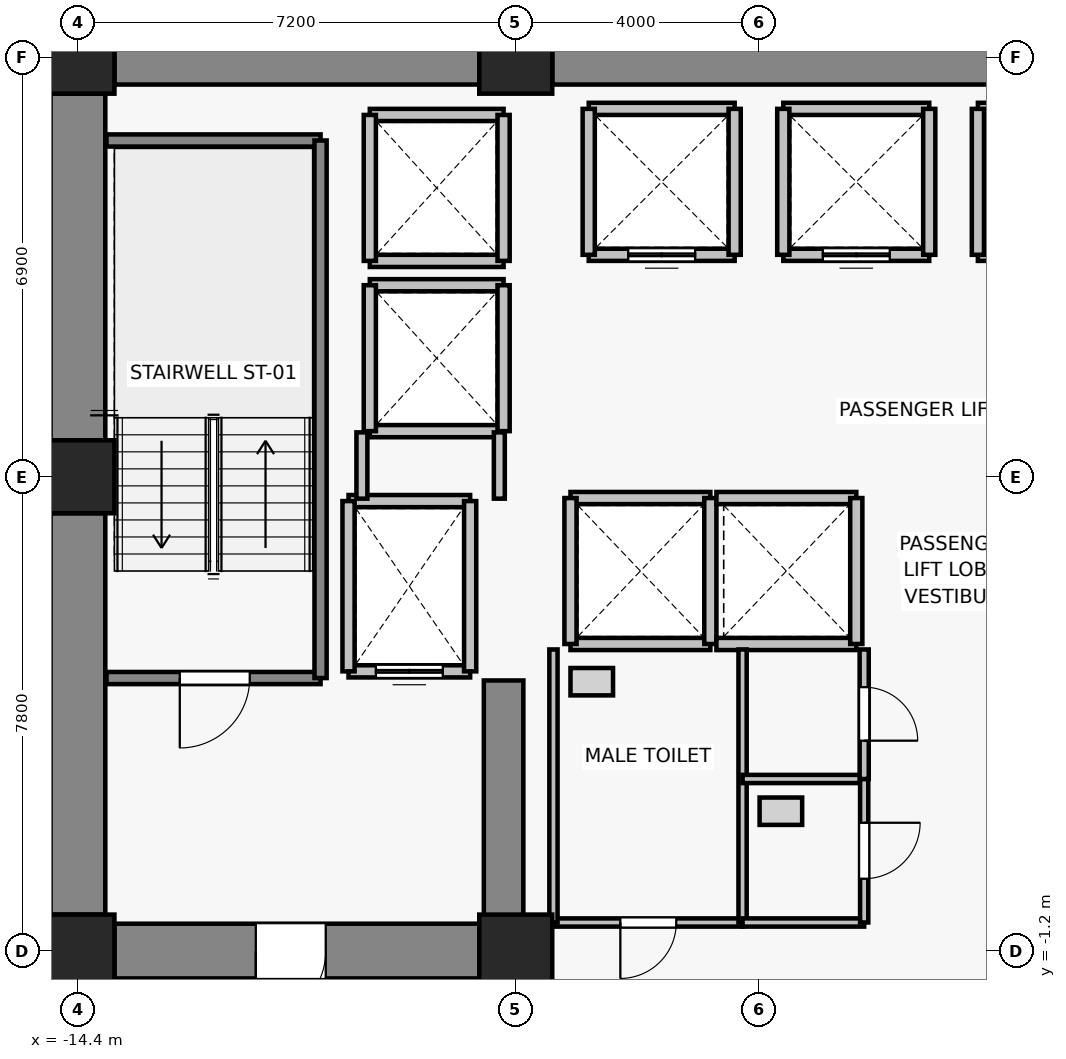
"""IFC4 building model, lengths in metres.
Left out: names, types, materials, properties, quantities, classifications, styles, units other than length and angle.
Written with IfcOpenShell. Run it as: python <this file> out.ifc"""

import sys

from ifc_helpers import new_model, si_unit, direction, frame, frame_2d, origin, origin_2d, place, context, subcontext, project, spatial, rectangle, extrude, source, transform, mapped, element, fill, save


model = new_model("IFC4")
c1 = context("Model", 3, precision=1e-05, world=origin(), true_north=direction((0.0, 1.0)))
c2 = subcontext(c1, "Body", "Model", "MODEL_VIEW")
j1 = project(units=[si_unit("LENGTHUNIT", "METRE"), si_unit("PLANEANGLEUNIT", "RADIAN")], contexts=[c1])
p1 = place(None, origin())
s1 = spatial("IfcSite", under=j1, at=p1, CompositionType="ELEMENT")
p2 = place(p1, origin())
s2 = spatial("IfcBuilding", under=s1, at=p2, CompositionType="ELEMENT")
p3 = place(p2, frame((0.0, 0.0, 27.4)))
s3 = spatial("IfcBuildingStorey", under=s2, at=p3, CompositionType="ELEMENT", Elevation=27.4)
for number, where, z_axis, x_axis in (
    (1, (-14.4, -1.2, 0.0), (0.0, 0.0, 1.0), (1.0, 0.0, 0.0)),
    (2, (-7.2, -1.2, 0.0), (0.0, 0.0, 1.0), (1.0, 0.0, 0.0)),
    (3, (-14.4, 6.6, 0.0), (0.0, 0.0, 1.0), (1.0, 0.0, 0.0)),
    (4, (-14.4, 13.5, 0.0), (0.0, 0.0, 1.0), (1.0, 0.0, 0.0)),
    (5, (-7.2, 13.5, 0.0), (0.0, 0.0, 1.0), (1.0, 0.0, 0.0)),
):
    element("IfcColumn", number, at=place(p3, frame(where, z_axis=z_axis, x_axis=x_axis)), inside=s3, PredefinedType="COLUMN", context=c2, shape_type="SweptSolid", body=[
        extrude(rectangle(XDim=1.2, YDim=1.2, at=origin_2d()), origin(), (0.0, 0.0, 1.0), 3.3),
    ])
p4 = place(p3, frame((-13.8, 13.5, 0.0), z_axis=(0.0, 0.0, 1.0), x_axis=(1.0, 0.0, 0.0)))
e6 = element("IfcWall", 6, at=p4, inside=s3, PredefinedType="SHEAR", context=c2, shape_type="SweptSolid", body=[
    extrude(rectangle(XDim=6.0, YDim=0.9, at=frame_2d((3.0, 0.0))), origin(), (0.0, 0.0, 1.0), 3.075),
])
p5 = place(p3, frame((-6.6, 13.5, 0.0), z_axis=(0.0, 0.0, 1.0), x_axis=(1.0, 0.0, 0.0)))
e7 = element("IfcWall", 7, at=p5, inside=s3, PredefinedType="SHEAR", context=c2, shape_type="SweptSolid", body=[
    extrude(rectangle(XDim=13.2, YDim=0.9, at=frame_2d((6.6, 0.0))), origin(), (0.0, 0.0, 1.0), 3.075),
])
p6 = place(p3, frame((-14.4, -0.6, 0.0), z_axis=(0.0, 0.0, 1.0), x_axis=(0.0, 1.0, 0.0)))
e8 = element("IfcWall", 8, at=p6, inside=s3, PredefinedType="SHEAR", context=c2, shape_type="SweptSolid", body=[
    extrude(rectangle(XDim=6.6, YDim=0.9, at=frame_2d((3.3, 0.0))), origin(), (0.0, 0.0, 1.0), 3.075),
])
p7 = place(p3, frame((-14.4, 7.2, 0.0), z_axis=(0.0, 0.0, 1.0), x_axis=(0.0, 1.0, 0.0)))
e9 = element("IfcWall", 9, at=p7, inside=s3, PredefinedType="SHEAR", context=c2, shape_type="SweptSolid", body=[
    extrude(rectangle(XDim=5.7, YDim=0.9, at=frame_2d((2.85, 0.0))), origin(), (0.0, 0.0, 1.0), 3.075),
])
p8 = place(p3, frame((-7.8, -1.2, 0.0), z_axis=(0.0, 0.0, 1.0), x_axis=(-1.0, 0.0, 0.0)))
e10 = element("IfcWall", 10, at=p8, inside=s3, PredefinedType="SHEAR", context=c2, shape_type="SweptSolid", body=[
    extrude(rectangle(XDim=6.0, YDim=0.9, at=frame_2d((3.0, 0.0))), origin(), (0.0, 0.0, 1.0), 3.075),
])
p9 = place(p8, frame((2.525, 0.0, 0.0)))
e11 = element("IfcOpeningElement", 11, at=p9, cuts=e10, PredefinedType="OPENING", context=c2, shape_type="SweptSolid", body=[
    extrude(rectangle(XDim=1.15, YDim=2.15, at=frame_2d((0.575, 1.075))), frame((0.0, 0.46, 0.0), z_axis=(0.0, -1.0, 0.0), x_axis=(1.0, 0.0, 0.0)), (0.0, 0.0, 1.0), 0.92),
])
p10 = place(p3, frame((-7.4, -0.75, 0.0), z_axis=(0.0, 0.0, 1.0), x_axis=(0.0, 1.0, 0.0)))
e12 = element("IfcWall", 12, at=p10, inside=s3, PredefinedType="SHEAR", context=c2, shape_type="SweptSolid", body=[
    extrude(rectangle(XDim=4.0, YDim=0.65, at=frame_2d((2.0, 0.0))), origin(), (0.0, 0.0, 1.0), 3.075),
])
p11 = place(p3, frame((-7.95, 3.4, 0.0), z_axis=(0.0, 0.0, 1.0), x_axis=(-1.0, 0.0, 0.0)))
e13 = element("IfcWall", 13, at=p11, inside=s3, PredefinedType="SOLIDWALL", context=c2, shape_type="SweptSolid", body=[
    extrude(rectangle(XDim=2.0, YDim=0.2, at=frame_2d((1.0, 0.0))), origin(), (0.0, 0.0, 1.0), 3.075),
])
p12 = place(p11, frame((0.45, 0.0, 0.0)))
e14 = element("IfcOpeningElement", 14, at=p12, cuts=e13, PredefinedType="OPENING", context=c2, shape_type="SweptSolid", body=[
    extrude(rectangle(XDim=1.1, YDim=2.2, at=frame_2d((0.55, 1.1))), frame((0.0, 0.11, 0.0), z_axis=(0.0, -1.0, 0.0), x_axis=(1.0, 0.0, 0.0)), (0.0, 0.0, 1.0), 0.22),
])
p13 = place(p3, frame((-9.95, 6.2, 0.0), z_axis=(0.0, 0.0, 1.0), x_axis=(1.0, 0.0, 0.0)))
e15 = element("IfcWall", 15, at=p13, inside=s3, PredefinedType="SOLIDWALL", context=c2, shape_type="SweptSolid", body=[
    extrude(rectangle(XDim=2.0, YDim=0.2, at=frame_2d((1.0, 0.0))), origin(), (0.0, 0.0, 1.0), 3.075),
])
for number, where, z_axis, x_axis in (
    (16, (-9.95, 3.4, 0.0), (0.0, 0.0, 1.0), (0.0, 1.0, 0.0)),
    (17, (-7.95, 6.2, 0.0), (0.0, 0.0, 1.0), (0.0, -1.0, 0.0)),
):
    element("IfcWall", number, at=place(p3, frame(where, z_axis=z_axis, x_axis=x_axis)), inside=s3, PredefinedType="SOLIDWALL", context=c2, shape_type="SweptSolid", body=[
        extrude(rectangle(XDim=2.8, YDim=0.2, at=frame_2d((1.4, 0.0))), origin(), (0.0, 0.0, 1.0), 3.075),
    ])
p14 = place(p3, frame((-3.6, 10.25, 0.0), z_axis=(0.0, 0.0, 1.0), x_axis=(-1.0, 0.0, 0.0)))
e18 = element("IfcWall", 18, at=p14, inside=s3, PredefinedType="SOLIDWALL", context=c2, shape_type="SweptSolid", body=[
    extrude(rectangle(XDim=2.4, YDim=0.2, at=frame_2d((1.2, 0.0))), origin(), (0.0, 0.0, 1.0), 3.075),
])
p15 = place(p14, frame((0.65, 0.0, 0.0)))
e19 = element("IfcOpeningElement", 19, at=p15, cuts=e18, PredefinedType="OPENING", context=c2, shape_type="SweptSolid", body=[
    extrude(rectangle(XDim=1.1, YDim=2.2, at=frame_2d((0.55, 1.1))), frame((0.0, 0.11, 0.0), z_axis=(0.0, -1.0, 0.0), x_axis=(1.0, 0.0, 0.0)), (0.0, 0.0, 1.0), 0.22),
])
for number, where, z_axis, x_axis in (
    (20, (-6.0, 12.65, 0.0), (0.0, 0.0, 1.0), (1.0, 0.0, 0.0)),
    (21, (-6.0, 10.25, 0.0), (0.0, 0.0, 1.0), (0.0, 1.0, 0.0)),
    (22, (-3.6, 12.65, 0.0), (0.0, 0.0, 1.0), (0.0, -1.0, 0.0)),
):
    element("IfcWall", number, at=place(p3, frame(where, z_axis=z_axis, x_axis=x_axis)), inside=s3, PredefinedType="SOLIDWALL", context=c2, shape_type="SweptSolid", body=[
        extrude(rectangle(XDim=2.4, YDim=0.2, at=frame_2d((1.2, 0.0))), origin(), (0.0, 0.0, 1.0), 3.075),
    ])
p16 = place(p3, frame((-0.4, 10.25, 0.0), z_axis=(0.0, 0.0, 1.0), x_axis=(-1.0, 0.0, 0.0)))
e23 = element("IfcWall", 23, at=p16, inside=s3, PredefinedType="SOLIDWALL", context=c2, shape_type="SweptSolid", body=[
    extrude(rectangle(XDim=2.4, YDim=0.2, at=frame_2d((1.2, 0.0))), origin(), (0.0, 0.0, 1.0), 3.075),
])
p17 = place(p16, frame((0.65, 0.0, 0.0)))
e24 = element("IfcOpeningElement", 24, at=p17, cuts=e23, PredefinedType="OPENING", context=c2, shape_type="SweptSolid", body=[
    extrude(rectangle(XDim=1.1, YDim=2.2, at=frame_2d((0.55, 1.1))), frame((0.0, 0.11, 0.0), z_axis=(0.0, -1.0, 0.0), x_axis=(1.0, 0.0, 0.0)), (0.0, 0.0, 1.0), 0.22),
])
p18 = place(p3, frame((-2.8, 12.65, 0.0), z_axis=(0.0, 0.0, 1.0), x_axis=(1.0, 0.0, 0.0)))
e25 = element("IfcWall", 25, at=p18, inside=s3, PredefinedType="SOLIDWALL", context=c2, shape_type="SweptSolid", body=[
    extrude(rectangle(XDim=2.4, YDim=0.2, at=frame_2d((1.2, 0.0))), origin(), (0.0, 0.0, 1.0), 3.075),
])
for number, where, z_axis, x_axis in (
    (26, (-2.8, 10.25, 0.0), (0.0, 0.0, 1.0), (0.0, 1.0, 0.0)),
    (27, (-0.4, 12.65, 0.0), (0.0, 0.0, 1.0), (0.0, -1.0, 0.0)),
):
    element("IfcWall", number, at=place(p3, frame(where, z_axis=z_axis, x_axis=x_axis)), inside=s3, PredefinedType="SOLIDWALL", context=c2, shape_type="SweptSolid", body=[
        extrude(rectangle(XDim=2.4, YDim=0.2, at=frame_2d((1.2, 0.0))), origin(), (0.0, 0.0, 1.0), 3.075),
    ])
p19 = place(p3, frame((2.8, 10.25, 0.0), z_axis=(0.0, 0.0, 1.0), x_axis=(-1.0, 0.0, 0.0)))
e28 = element("IfcWall", 28, at=p19, inside=s3, PredefinedType="SOLIDWALL", context=c2, shape_type="SweptSolid", body=[
    extrude(rectangle(XDim=2.4, YDim=0.2, at=frame_2d((1.2, 0.0))), origin(), (0.0, 0.0, 1.0), 3.075),
])
p20 = place(p19, frame((0.65, 0.0, 0.0)))
e29 = element("IfcOpeningElement", 29, at=p20, cuts=e28, PredefinedType="OPENING", context=c2, shape_type="SweptSolid", body=[
    extrude(rectangle(XDim=1.1, YDim=2.2, at=frame_2d((0.55, 1.1))), frame((0.0, 0.11, 0.0), z_axis=(0.0, -1.0, 0.0), x_axis=(1.0, 0.0, 0.0)), (0.0, 0.0, 1.0), 0.22),
])
p21 = place(p3, frame((0.4, 12.65, 0.0), z_axis=(0.0, 0.0, 1.0), x_axis=(1.0, 0.0, 0.0)))
e30 = element("IfcWall", 30, at=p21, inside=s3, PredefinedType="SOLIDWALL", context=c2, shape_type="SweptSolid", body=[
    extrude(rectangle(XDim=2.4, YDim=0.2, at=frame_2d((1.2, 0.0))), origin(), (0.0, 0.0, 1.0), 3.075),
])
p22 = place(p3, frame((0.4, 10.25, 0.0), z_axis=(0.0, 0.0, 1.0), x_axis=(0.0, 1.0, 0.0)))
e31 = element("IfcWall", 31, at=p22, inside=s3, PredefinedType="SOLIDWALL", context=c2, shape_type="SweptSolid", body=[
    extrude(rectangle(XDim=2.4, YDim=0.2, at=frame_2d((1.2, 0.0))), origin(), (0.0, 0.0, 1.0), 3.075),
])
for number, where, z_axis, x_axis in (
    (32, (-4.0, 3.85, 0.0), (0.0, 0.0, 1.0), (-1.0, 0.0, 0.0)),
    (33, (-6.3, 6.25, 0.0), (0.0, 0.0, 1.0), (1.0, 0.0, 0.0)),
):
    element("IfcWall", number, at=place(p3, frame(where, z_axis=z_axis, x_axis=x_axis)), inside=s3, PredefinedType="SOLIDWALL", context=c2, shape_type="SweptSolid", body=[
        extrude(rectangle(XDim=2.3, YDim=0.2, at=frame_2d((1.15, 0.0))), origin(), (0.0, 0.0, 1.0), 3.075),
    ])
for number, where, z_axis, x_axis in (
    (34, (-6.3, 3.85, 0.0), (0.0, 0.0, 1.0), (0.0, 1.0, 0.0)),
    (35, (-4.0, 6.25, 0.0), (0.0, 0.0, 1.0), (0.0, -1.0, 0.0)),
):
    element("IfcWall", number, at=place(p3, frame(where, z_axis=z_axis, x_axis=x_axis)), inside=s3, PredefinedType="SOLIDWALL", context=c2, shape_type="SweptSolid", body=[
        extrude(rectangle(XDim=2.4, YDim=0.2, at=frame_2d((1.2, 0.0))), origin(), (0.0, 0.0, 1.0), 3.075),
    ])
for number, where, z_axis, x_axis in (
    (36, (-1.6, 3.85, 0.0), (0.0, 0.0, 1.0), (-1.0, 0.0, 0.0)),
    (37, (-3.9, 6.25, 0.0), (0.0, 0.0, 1.0), (1.0, 0.0, 0.0)),
):
    element("IfcWall", number, at=place(p3, frame(where, z_axis=z_axis, x_axis=x_axis)), inside=s3, PredefinedType="SOLIDWALL", context=c2, shape_type="SweptSolid", body=[
        extrude(rectangle(XDim=2.3, YDim=0.2, at=frame_2d((1.15, 0.0))), origin(), (0.0, 0.0, 1.0), 3.075),
    ])
p23 = place(p3, frame((-1.6, 6.25, 0.0), z_axis=(0.0, 0.0, 1.0), x_axis=(0.0, -1.0, 0.0)))
e38 = element("IfcWall", 38, at=p23, inside=s3, PredefinedType="SOLIDWALL", context=c2, shape_type="SweptSolid", body=[
    extrude(rectangle(XDim=2.4, YDim=0.2, at=frame_2d((1.2, 0.0))), origin(), (0.0, 0.0, 1.0), 3.075),
])
for number, where, z_axis, x_axis in (
    (39, (-7.4, 7.35, 0.0), (0.0, 0.0, 1.0), (-1.0, 0.0, 0.0)),
    (40, (-9.6, 9.75, 0.0), (0.0, 0.0, 1.0), (1.0, 0.0, 0.0)),
):
    element("IfcWall", number, at=place(p3, frame(where, z_axis=z_axis, x_axis=x_axis)), inside=s3, PredefinedType="SOLIDWALL", context=c2, shape_type="SweptSolid", body=[
        extrude(rectangle(XDim=2.2, YDim=0.2, at=frame_2d((1.1, 0.0))), origin(), (0.0, 0.0, 1.0), 2.465),
    ])
p24 = place(p3, frame((-9.6, 7.35, 0.0), z_axis=(0.0, 0.0, 1.0), x_axis=(0.0, 1.0, 0.0)))
e41 = element("IfcWall", 41, at=p24, inside=s3, PredefinedType="SOLIDWALL", context=c2, shape_type="SweptSolid", body=[
    extrude(rectangle(XDim=2.4, YDim=0.2, at=frame_2d((1.2, 0.0))), origin(), (0.0, 0.0, 1.0), 3.075),
])
p25 = place(p3, frame((-7.4, 9.75, 0.0), z_axis=(0.0, 0.0, 1.0), x_axis=(0.0, -1.0, 0.0)))
e42 = element("IfcWall", 42, at=p25, inside=s3, PredefinedType="SOLIDWALL", context=c2, shape_type="SweptSolid", body=[
    extrude(rectangle(XDim=2.4, YDim=0.2, at=frame_2d((1.2, 0.0))), origin(), (0.0, 0.0, 1.0), 2.465),
])
for number, where, z_axis, x_axis in (
    (43, (-7.4, 10.15, 0.0), (0.0, 0.0, 1.0), (-1.0, 0.0, 0.0)),
    (44, (-9.6, 12.55, 0.0), (0.0, 0.0, 1.0), (1.0, 0.0, 0.0)),
):
    element("IfcWall", number, at=place(p3, frame(where, z_axis=z_axis, x_axis=x_axis)), inside=s3, PredefinedType="SOLIDWALL", context=c2, shape_type="SweptSolid", body=[
        extrude(rectangle(XDim=2.2, YDim=0.2, at=frame_2d((1.1, 0.0))), origin(), (0.0, 0.0, 1.0), 2.465),
    ])
p26 = place(p3, frame((-9.6, 10.15, 0.0), z_axis=(0.0, 0.0, 1.0), x_axis=(0.0, 1.0, 0.0)))
e45 = element("IfcWall", 45, at=p26, inside=s3, PredefinedType="SOLIDWALL", context=c2, shape_type="SweptSolid", body=[
    extrude(rectangle(XDim=2.4, YDim=0.2, at=frame_2d((1.2, 0.0))), origin(), (0.0, 0.0, 1.0), 3.075),
])
p27 = place(p3, frame((-7.4, 12.55, 0.0), z_axis=(0.0, 0.0, 1.0), x_axis=(0.0, -1.0, 0.0)))
e46 = element("IfcWall", 46, at=p27, inside=s3, PredefinedType="SOLIDWALL", context=c2, shape_type="SweptSolid", body=[
    extrude(rectangle(XDim=2.4, YDim=0.2, at=frame_2d((1.2, 0.0))), origin(), (0.0, 0.0, 1.0), 2.465),
])
p28 = place(p3, frame((-10.41, 3.29, 0.0), z_axis=(0.0, 0.0, 1.0), x_axis=(-1.0, 0.0, 0.0)))
e47 = element("IfcWall", 47, at=p28, inside=s3, PredefinedType="SOLIDWALL", context=c2, shape_type="SweptSolid", body=[
    extrude(rectangle(XDim=3.52, YDim=0.2, at=frame_2d((1.76, 0.0))), origin(), (0.0, 0.0, 1.0), 3.075),
])
p29 = place(p28, frame((1.165, 0.0, 0.0)))
e48 = element("IfcOpeningElement", 48, at=p29, cuts=e47, PredefinedType="OPENING", context=c2, shape_type="SweptSolid", body=[
    extrude(rectangle(XDim=1.15, YDim=2.15, at=frame_2d((0.575, 1.075))), frame((0.0, 0.11, 0.0), z_axis=(0.0, -1.0, 0.0), x_axis=(1.0, 0.0, 0.0)), (0.0, 0.0, 1.0), 0.22),
])
p30 = place(p3, frame((-13.93, 12.13, 0.0), z_axis=(0.0, 0.0, 1.0), x_axis=(1.0, 0.0, 0.0)))
e49 = element("IfcWall", 49, at=p30, inside=s3, PredefinedType="SOLIDWALL", context=c2, shape_type="SweptSolid", body=[
    extrude(rectangle(XDim=3.52, YDim=0.2, at=frame_2d((1.76, 0.0))), origin(), (0.0, 0.0, 1.0), 3.075),
])
p31 = place(p3, frame((-10.41, 12.13, 0.0), z_axis=(0.0, 0.0, 1.0), x_axis=(0.0, -1.0, 0.0)))
e50 = element("IfcWall", 50, at=p31, inside=s3, PredefinedType="SOLIDWALL", context=c2, shape_type="SweptSolid", body=[
    extrude(rectangle(XDim=8.84, YDim=0.2, at=frame_2d((4.42, 0.0))), origin(), (0.0, 0.0, 1.0), 3.075),
])
p32 = place(p3, frame((-9.73, 6.24, 0.0), z_axis=(0.0, 0.0, 1.0), x_axis=(0.0, 1.0, 0.0)))
e51 = element("IfcWall", 51, at=p32, inside=s3, PredefinedType="PARTITIONING", context=c2, shape_type="SweptSolid", body=[
    extrude(rectangle(XDim=1.09, YDim=0.18, at=frame_2d((0.545, 0.0))), origin(), (0.0, 0.0, 1.0), 3.075),
])
p33 = place(p3, frame((-7.47, 7.33, 0.0), z_axis=(0.0, 0.0, 1.0), x_axis=(0.0, -1.0, 0.0)))
e52 = element("IfcWall", 52, at=p33, inside=s3, PredefinedType="PARTITIONING", context=c2, shape_type="SweptSolid", body=[
    extrude(rectangle(XDim=1.09, YDim=0.18, at=frame_2d((0.545, 0.0))), origin(), (0.0, 0.0, 1.0), 2.465),
])
p34 = place(p3, frame((-3.47, -0.73, 0.0), z_axis=(0.0, 0.0, 1.0), x_axis=(-1.0, 0.0, 0.0)))
e53 = element("IfcWall", 53, at=p34, inside=s3, PredefinedType="PARTITIONING", context=c2, shape_type="SweptSolid", body=[
    extrude(rectangle(XDim=3.11, YDim=0.135, at=frame_2d((1.555, 0.0))), origin(), (0.0, 0.0, 1.0), 3.075),
])
p35 = place(p34, frame((1.09, 0.0, 0.0)))
e54 = element("IfcOpeningElement", 54, at=p35, cuts=e53, PredefinedType="OPENING", context=c2, shape_type="SweptSolid", body=[
    extrude(rectangle(XDim=0.92, YDim=2.1, at=frame_2d((0.46, 1.05))), frame((0.0, 0.077, 0.0), z_axis=(0.0, -1.0, 0.0), x_axis=(1.0, 0.0, 0.0)), (0.0, 0.0, 1.0), 0.155),
])
for number, where, z_axis, x_axis in (
    (55, (-6.58, -0.73, 0.0), (0.0, 0.0, 1.0), (0.0, 1.0, 0.0)),
    (56, (-3.47, 3.76, 0.0), (0.0, 0.0, 1.0), (0.0, -1.0, 0.0)),
):
    element("IfcWall", number, at=place(p3, frame(where, z_axis=z_axis, x_axis=x_axis)), inside=s3, PredefinedType="PARTITIONING", context=c2, shape_type="SweptSolid", body=[
        extrude(rectangle(XDim=4.49, YDim=0.135, at=frame_2d((2.245, 0.0))), origin(), (0.0, 0.0, 1.0), 3.075),
    ])
for number, where, z_axis, x_axis in (
    (57, (-1.47, -0.73, 0.0), (0.0, 0.0, 1.0), (-1.0, 0.0, 0.0)),
    (58, (-3.47, 1.63, 0.0), (0.0, 0.0, 1.0), (1.0, 0.0, 0.0)),
):
    element("IfcWall", number, at=place(p3, frame(where, z_axis=z_axis, x_axis=x_axis)), inside=s3, PredefinedType="PARTITIONING", context=c2, shape_type="SweptSolid", body=[
        extrude(rectangle(XDim=2.0, YDim=0.135, at=frame_2d((1.0, 0.0))), origin(), (0.0, 0.0, 1.0), 3.075),
    ])
p36 = place(p3, frame((-1.47, 1.63, 0.0), z_axis=(0.0, 0.0, 1.0), x_axis=(0.0, -1.0, 0.0)))
e59 = element("IfcWall", 59, at=p36, inside=s3, PredefinedType="PARTITIONING", context=c2, shape_type="SweptSolid", body=[
    extrude(rectangle(XDim=2.36, YDim=0.135, at=frame_2d((1.18, 0.0))), origin(), (0.0, 0.0, 1.0), 3.075),
])
p37 = place(p36, frame((0.72, 0.0, 0.0)))
e60 = element("IfcOpeningElement", 60, at=p37, cuts=e59, PredefinedType="OPENING", context=c2, shape_type="SweptSolid", body=[
    extrude(rectangle(XDim=0.92, YDim=2.1, at=frame_2d((0.46, 1.05))), frame((0.0, 0.077, 0.0), z_axis=(0.0, -1.0, 0.0), x_axis=(1.0, 0.0, 0.0)), (0.0, 0.0, 1.0), 0.155),
])
p38 = place(p3, frame((-1.47, 3.76, 0.0), z_axis=(0.0, 0.0, 1.0), x_axis=(0.0, -1.0, 0.0)))
e61 = element("IfcWall", 61, at=p38, inside=s3, PredefinedType="PARTITIONING", context=c2, shape_type="SweptSolid", body=[
    extrude(rectangle(XDim=2.13, YDim=0.15, at=frame_2d((1.065, 0.0))), origin(), (0.0, 0.0, 1.0), 3.075),
])
p39 = place(p38, frame((0.62, 0.0, 0.0)))
e62 = element("IfcOpeningElement", 62, at=p39, cuts=e61, PredefinedType="OPENING", context=c2, shape_type="SweptSolid", body=[
    extrude(rectangle(XDim=0.88, YDim=2.1, at=frame_2d((0.44, 1.05))), frame((0.0, 0.085, 0.0), z_axis=(0.0, -1.0, 0.0), x_axis=(1.0, 0.0, 0.0)), (0.0, 0.0, 1.0), 0.17),
])
m1 = source(origin(), c2, "Body", "SweptSolid", [
    extrude(rectangle(XDim=1.1, YDim=2.2, at=frame_2d((0.55, 1.1))), frame((0.0, 0.025, 0.0), z_axis=(0.0, -1.0, 0.0), x_axis=(1.0, 0.0, 0.0)), (0.0, 0.0, 1.0), 0.05),
])
p40 = place(p12, origin())
e63 = element("IfcDoor", 63, at=p40, inside=s3, OperationType="DOUBLE_DOOR_SLIDING", PredefinedType="DOOR", context=c2, shape_type="MappedRepresentation", body=[
    mapped(m1, transform((0.0, 0.0, 0.0), x_axis=(1.0, 0.0, 0.0), y_axis=(0.0, 1.0, 0.0), z_axis=(0.0, 0.0, 1.0), scale=1.0)),
])
fill(e14, e63)
p41 = place(p15, origin())
e64 = element("IfcDoor", 64, at=p41, inside=s3, OperationType="DOUBLE_DOOR_SLIDING", PredefinedType="DOOR", context=c2, shape_type="MappedRepresentation", body=[
    mapped(m1, transform((0.0, 0.0, 0.0), x_axis=(1.0, 0.0, 0.0), y_axis=(0.0, 1.0, 0.0), z_axis=(0.0, 0.0, 1.0), scale=1.0)),
])
fill(e19, e64)
p42 = place(p17, origin())
e65 = element("IfcDoor", 65, at=p42, inside=s3, OperationType="DOUBLE_DOOR_SLIDING", PredefinedType="DOOR", context=c2, shape_type="MappedRepresentation", body=[
    mapped(m1, transform((0.0, 0.0, 0.0), x_axis=(1.0, 0.0, 0.0), y_axis=(0.0, 1.0, 0.0), z_axis=(0.0, 0.0, 1.0), scale=1.0)),
])
fill(e24, e65)
m2 = source(origin(), c2, "Body", "SweptSolid", [
    extrude(rectangle(XDim=1.15, YDim=2.15, at=frame_2d((0.575, 1.075))), frame((0.0, 0.025, 0.0), z_axis=(0.0, -1.0, 0.0), x_axis=(1.0, 0.0, 0.0)), (0.0, 0.0, 1.0), 0.05),
])
p43 = place(p29, origin())
e66 = element("IfcDoor", 66, at=p43, inside=s3, OperationType="SINGLE_SWING_RIGHT", PredefinedType="DOOR", context=c2, shape_type="MappedRepresentation", body=[
    mapped(m2, transform((0.0, 0.0, 0.0), x_axis=(1.0, 0.0, 0.0), y_axis=(0.0, 1.0, 0.0), z_axis=(0.0, 0.0, 1.0), scale=1.0)),
])
fill(e48, e66)
p44 = place(p9, origin())
e67 = element("IfcDoor", 67, at=p44, inside=s3, OperationType="SINGLE_SWING_RIGHT", PredefinedType="DOOR", context=c2, shape_type="MappedRepresentation", body=[
    mapped(m2, transform((0.0, 0.0, 0.0), x_axis=(1.0, 0.0, 0.0), y_axis=(0.0, 1.0, 0.0), z_axis=(0.0, 0.0, 1.0), scale=1.0)),
])
fill(e11, e67)
m3 = source(origin(), c2, "Body", "SweptSolid", [
    extrude(rectangle(XDim=0.92, YDim=2.1, at=frame_2d((0.46, 1.05))), frame((0.0, 0.025, 0.0), z_axis=(0.0, -1.0, 0.0), x_axis=(1.0, 0.0, 0.0)), (0.0, 0.0, 1.0), 0.05),
])
p45 = place(p35, origin())
e68 = element("IfcDoor", 68, at=p45, inside=s3, OperationType="SINGLE_SWING_RIGHT", PredefinedType="DOOR", context=c2, shape_type="MappedRepresentation", body=[
    mapped(m3, transform((0.0, 0.0, 0.0), x_axis=(1.0, 0.0, 0.0), y_axis=(0.0, 1.0, 0.0), z_axis=(0.0, 0.0, 1.0), scale=1.0)),
])
fill(e54, e68)
p46 = place(p37, origin())
e69 = element("IfcDoor", 69, at=p46, inside=s3, OperationType="SINGLE_SWING_LEFT", PredefinedType="DOOR", context=c2, shape_type="MappedRepresentation", body=[
    mapped(m3, transform((0.0, 0.0, 0.0), x_axis=(1.0, 0.0, 0.0), y_axis=(0.0, 1.0, 0.0), z_axis=(0.0, 0.0, 1.0), scale=1.0)),
])
fill(e60, e69)
m4 = source(origin(), c2, "Body", "SweptSolid", [
    extrude(rectangle(XDim=0.88, YDim=2.1, at=frame_2d((0.44, 1.05))), frame((0.0, 0.025, 0.0), z_axis=(0.0, -1.0, 0.0), x_axis=(1.0, 0.0, 0.0)), (0.0, 0.0, 1.0), 0.05),
])
p47 = place(p39, origin())
e70 = element("IfcDoor", 70, at=p47, inside=s3, OperationType="SINGLE_SWING_RIGHT", PredefinedType="DOOR", context=c2, shape_type="MappedRepresentation", body=[
    mapped(m4, transform((0.0, 0.0, 0.0), x_axis=(1.0, 0.0, 0.0), y_axis=(0.0, 1.0, 0.0), z_axis=(0.0, 0.0, 1.0), scale=1.0)),
])
fill(e62, e70)
save(model, sys.argv[1])
